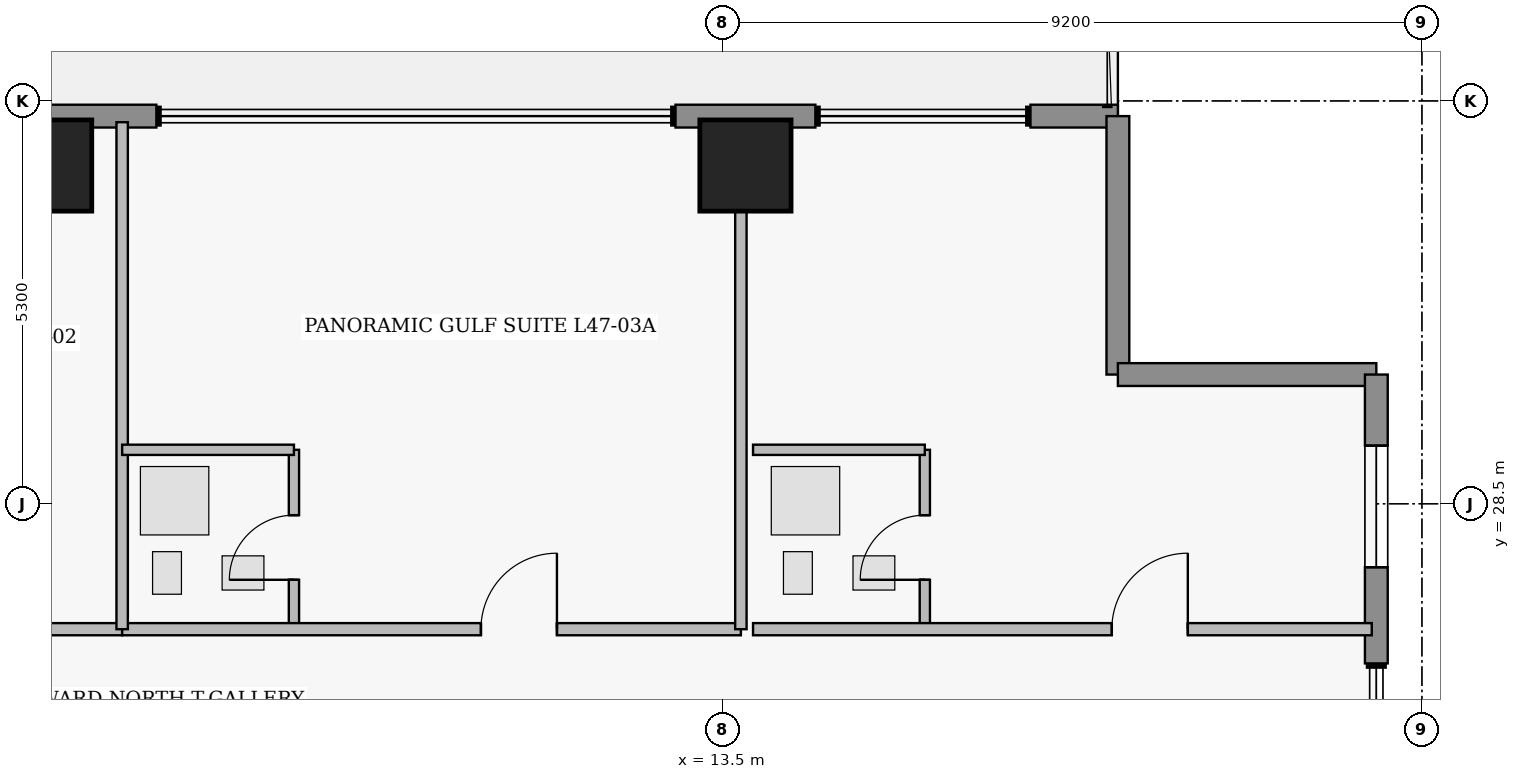
"""IFC4 building model, lengths in metres.
Left out: names, types, materials, properties, quantities, classifications, styles, units other than length and angle.
Written with IfcOpenShell. Run it as: python <this file> out.ifc"""

import sys

from ifc_helpers import new_model, si_unit, direction, frame, frame_2d, origin, origin_2d, place, context, subcontext, project, spatial, rectangle, extrude, element, fill, save


model = new_model("IFC4")
c1 = context("Model", 3, precision=1e-05, world=origin(), true_north=direction((0.0, 1.0)))
c2 = subcontext(c1, "Body", "Model", "MODEL_VIEW")
j1 = project(units=[si_unit("LENGTHUNIT", "METRE"), si_unit("PLANEANGLEUNIT", "RADIAN")], contexts=[c1])
p1 = place(None, origin())
s1 = spatial("IfcSite", under=j1, at=p1, CompositionType="ELEMENT")
p2 = place(p1, origin())
s2 = spatial("IfcBuilding", under=s1, at=p2, CompositionType="ELEMENT")
p3 = place(p2, frame((0.0, 0.0, 188.65)))
s3 = spatial("IfcBuildingStorey", under=s2, at=p3, CompositionType="ELEMENT", Elevation=188.65)
for number, where, z_axis, x_axis in (
    (1, (4.6, 32.95, 0.0), (0.0, 0.0, 1.0), (1.0, 0.0, 0.0)),
    (2, (13.8, 32.95, 0.0), (0.0, 0.0, 1.0), (1.0, 0.0, 0.0)),
):
    element("IfcColumn", number, at=place(p3, frame(where, z_axis=z_axis, x_axis=x_axis)), inside=s3, PredefinedType="COLUMN", context=c2, shape_type="SweptSolid", body=[
        extrude(rectangle(XDim=1.2, YDim=1.2, at=origin_2d()), origin(), (0.0, 0.0, 1.0), 3.75),
    ])
p4 = place(p3, frame((3.68, 33.6, 0.0), z_axis=(0.0, 0.0, 1.0), x_axis=(1.0, 0.0, 0.0)))
e3 = element("IfcWall", 3, at=p4, inside=s3, PredefinedType="STANDARD", context=c2, shape_type="SweptSolid", body=[
    extrude(rectangle(XDim=2.37, YDim=0.3, at=frame_2d((1.185, 0.0))), origin(), (0.0, 0.0, 1.0), 3.53),
])
p5 = place(p3, frame((12.88, 33.6, 0.0), z_axis=(0.0, 0.0, 1.0), x_axis=(1.0, 0.0, 0.0)))
e4 = element("IfcWall", 4, at=p5, inside=s3, PredefinedType="STANDARD", context=c2, shape_type="SweptSolid", body=[
    extrude(rectangle(XDim=1.84, YDim=0.3, at=frame_2d((0.92, 0.0))), origin(), (0.0, 0.0, 1.0), 3.53),
])
p6 = place(p3, frame((17.55, 33.6, 0.0), z_axis=(0.0, 0.0, 1.0), x_axis=(1.0, 0.0, 0.0)))
e5 = element("IfcWall", 5, at=p6, inside=s3, PredefinedType="STANDARD", context=c2, shape_type="SweptSolid", body=[
    extrude(rectangle(XDim=1.15, YDim=0.3, at=frame_2d((0.575, 0.0))), origin(), (0.0, 0.0, 1.0), 3.53),
])
for number, where, z_axis, x_axis in (
    (6, (18.7, 33.6, 0.0), (0.0, 0.0, 1.0), (0.0, -1.0, 0.0)),
    (7, (18.7, 30.2, 0.0), (0.0, 0.0, 1.0), (1.0, 0.0, 0.0)),
):
    element("IfcWall", number, at=place(p3, frame(where, z_axis=z_axis, x_axis=x_axis)), inside=s3, PredefinedType="STANDARD", context=c2, shape_type="SweptSolid", body=[
        extrude(rectangle(XDim=3.4, YDim=0.3, at=frame_2d((1.7, 0.0))), origin(), (0.0, 0.0, 1.0), 3.53),
    ])
p7 = place(p3, frame((22.1, 30.2, 0.0), z_axis=(0.0, 0.0, 1.0), x_axis=(0.0, -1.0, 0.0)))
e8 = element("IfcWall", 8, at=p7, inside=s3, PredefinedType="STANDARD", context=c2, shape_type="SweptSolid", body=[
    extrude(rectangle(XDim=3.8, YDim=0.3, at=frame_2d((1.9, 0.0))), origin(), (0.0, 0.0, 1.0), 3.53),
])
p8 = place(p7, frame((0.935, 0.0, 0.85)))
e9 = element("IfcOpeningElement", 9, at=p8, cuts=e8, PredefinedType="OPENING", context=c2, shape_type="SweptSolid", body=[
    extrude(rectangle(XDim=1.6, YDim=1.8, at=frame_2d((0.8, 0.9))), frame((0.0, 0.16, 0.0), z_axis=(0.0, -1.0, 0.0), x_axis=(1.0, 0.0, 0.0)), (0.0, 0.0, 1.0), 0.32),
])
p9 = place(p3, frame((-5.6, 26.85, 0.0), z_axis=(0.0, 0.0, 1.0), x_axis=(1.0, 0.0, 0.0)))
e10 = element("IfcWall", 10, at=p9, inside=s3, PredefinedType="PARTITIONING", context=c2, shape_type="SweptSolid", body=[
    extrude(rectangle(XDim=11.2, YDim=0.16, at=frame_2d((5.6, 0.0))), origin(), (0.0, 0.0, 1.0), 3.53),
])
p10 = place(p9, frame((6.25, 0.0, 0.0)))
e11 = element("IfcOpeningElement", 11, at=p10, cuts=e10, PredefinedType="OPENING", context=c2, shape_type="SweptSolid", body=[
    extrude(rectangle(XDim=1.0, YDim=2.15, at=frame_2d((0.5, 1.075))), frame((0.0, 0.09, 0.0), z_axis=(0.0, -1.0, 0.0), x_axis=(1.0, 0.0, 0.0)), (0.0, 0.0, 1.0), 0.18),
])
p11 = place(p3, frame((7.86, 26.85, 0.0), z_axis=(0.0, 0.0, 1.0), x_axis=(0.0, 1.0, 0.0)))
e12 = element("IfcWall", 12, at=p11, inside=s3, PredefinedType="PLUMBINGWALL", context=c2, shape_type="SweptSolid", body=[
    extrude(rectangle(XDim=2.36, YDim=0.135, at=frame_2d((1.18, 0.0))), origin(), (0.0, 0.0, 1.0), 3.53),
])
p12 = place(p11, frame((0.65, 0.0, 0.0)))
e13 = element("IfcOpeningElement", 13, at=p12, cuts=e12, PredefinedType="OPENING", context=c2, shape_type="SweptSolid", body=[
    extrude(rectangle(XDim=0.85, YDim=2.1, at=frame_2d((0.425, 1.05))), frame((0.0, 0.077, 0.0), z_axis=(0.0, -1.0, 0.0), x_axis=(1.0, 0.0, 0.0)), (0.0, 0.0, 1.0), 0.155),
])
p13 = place(p3, frame((5.6, 26.85, 0.0), z_axis=(0.0, 0.0, 1.0), x_axis=(1.0, 0.0, 0.0)))
e14 = element("IfcWall", 14, at=p13, inside=s3, PredefinedType="PARTITIONING", context=c2, shape_type="SweptSolid", body=[
    extrude(rectangle(XDim=8.14, YDim=0.16, at=frame_2d((4.07, 0.0))), origin(), (0.0, 0.0, 1.0), 3.53),
])
p14 = place(p13, frame((4.72, 0.0, 0.0)))
e15 = element("IfcOpeningElement", 15, at=p14, cuts=e14, PredefinedType="OPENING", context=c2, shape_type="SweptSolid", body=[
    extrude(rectangle(XDim=1.0, YDim=2.15, at=frame_2d((0.5, 1.075))), frame((0.0, 0.09, 0.0), z_axis=(0.0, -1.0, 0.0), x_axis=(1.0, 0.0, 0.0)), (0.0, 0.0, 1.0), 0.18),
])
p15 = place(p3, frame((16.16, 26.85, 0.0), z_axis=(0.0, 0.0, 1.0), x_axis=(0.0, 1.0, 0.0)))
e16 = element("IfcWall", 16, at=p15, inside=s3, PredefinedType="PLUMBINGWALL", context=c2, shape_type="SweptSolid", body=[
    extrude(rectangle(XDim=2.36, YDim=0.135, at=frame_2d((1.18, 0.0))), origin(), (0.0, 0.0, 1.0), 3.53),
])
p16 = place(p15, frame((0.65, 0.0, 0.0)))
e17 = element("IfcOpeningElement", 17, at=p16, cuts=e16, PredefinedType="OPENING", context=c2, shape_type="SweptSolid", body=[
    extrude(rectangle(XDim=0.85, YDim=2.1, at=frame_2d((0.425, 1.05))), frame((0.0, 0.077, 0.0), z_axis=(0.0, -1.0, 0.0), x_axis=(1.0, 0.0, 0.0)), (0.0, 0.0, 1.0), 0.155),
])
p17 = place(p3, frame((13.9, 26.85, 0.0), z_axis=(0.0, 0.0, 1.0), x_axis=(1.0, 0.0, 0.0)))
e18 = element("IfcWall", 18, at=p17, inside=s3, PredefinedType="PARTITIONING", context=c2, shape_type="SweptSolid", body=[
    extrude(rectangle(XDim=8.14, YDim=0.16, at=frame_2d((4.07, 0.0))), origin(), (0.0, 0.0, 1.0), 3.53),
])
p18 = place(p17, frame((4.72, 0.0, 0.0)))
e19 = element("IfcOpeningElement", 19, at=p18, cuts=e18, PredefinedType="OPENING", context=c2, shape_type="SweptSolid", body=[
    extrude(rectangle(XDim=1.0, YDim=2.15, at=frame_2d((0.5, 1.075))), frame((0.0, 0.09, 0.0), z_axis=(0.0, -1.0, 0.0), x_axis=(1.0, 0.0, 0.0)), (0.0, 0.0, 1.0), 0.18),
])
p19 = place(p3, frame((5.6, 26.85, 0.0), z_axis=(0.0, 0.0, 1.0), x_axis=(0.0, 1.0, 0.0)))
e20 = element("IfcWall", 20, at=p19, inside=s3, PredefinedType="PARTITIONING", context=c2, shape_type="SweptSolid", body=[
    extrude(rectangle(XDim=6.67, YDim=0.15, at=frame_2d((3.335, 0.0))), origin(), (0.0, 0.0, 1.0), 3.53),
])
p20 = place(p3, frame((5.6, 29.21, 0.0), z_axis=(0.0, 0.0, 1.0), x_axis=(1.0, 0.0, 0.0)))
e21 = element("IfcWall", 21, at=p20, inside=s3, PredefinedType="PLUMBINGWALL", context=c2, shape_type="SweptSolid", body=[
    extrude(rectangle(XDim=2.26, YDim=0.135, at=frame_2d((1.13, 0.0))), origin(), (0.0, 0.0, 1.0), 3.53),
])
p21 = place(p3, frame((13.74, 26.85, 0.0), z_axis=(0.0, 0.0, 1.0), x_axis=(0.0, 1.0, 0.0)))
e22 = element("IfcWall", 22, at=p21, inside=s3, PredefinedType="PARTITIONING", context=c2, shape_type="SweptSolid", body=[
    extrude(rectangle(XDim=6.67, YDim=0.15, at=frame_2d((3.335, 0.0))), origin(), (0.0, 0.0, 1.0), 2.519),
])
p22 = place(p3, frame((13.9, 29.21, 0.0), z_axis=(0.0, 0.0, 1.0), x_axis=(1.0, 0.0, 0.0)))
e23 = element("IfcWall", 23, at=p22, inside=s3, PredefinedType="PLUMBINGWALL", context=c2, shape_type="SweptSolid", body=[
    extrude(rectangle(XDim=2.26, YDim=0.135, at=frame_2d((1.13, 0.0))), origin(), (0.0, 0.0, 1.0), 3.53),
])
p23 = place(p8, origin())
e24 = element("IfcWindow", 24, at=p23, inside=s3, PartitioningType="SINGLE_PANEL", PredefinedType="WINDOW", context=c2, shape_type="SweptSolid", body=[
    extrude(rectangle(XDim=1.6, YDim=1.8, at=frame_2d((0.8, 0.9))), frame((0.0, 0.03, 0.0), z_axis=(0.0, -1.0, 0.0), x_axis=(1.0, 0.0, 0.0)), (0.0, 0.0, 1.0), 0.06),
])
fill(e9, e24)
p24 = place(p12, origin())
e25 = element("IfcDoor", 25, at=p24, inside=s3, OperationType="SINGLE_SWING_LEFT", PredefinedType="DOOR", context=c2, shape_type="SweptSolid", body=[
    extrude(rectangle(XDim=0.85, YDim=2.1, at=frame_2d((0.425, 1.05))), frame((0.0, 0.025, 0.0), z_axis=(0.0, -1.0, 0.0), x_axis=(1.0, 0.0, 0.0)), (0.0, 0.0, 1.0), 0.05),
])
fill(e13, e25)
p25 = place(p14, origin())
e26 = element("IfcDoor", 26, at=p25, inside=s3, OperationType="SINGLE_SWING_RIGHT", PredefinedType="DOOR", context=c2, shape_type="SweptSolid", body=[
    extrude(rectangle(XDim=1.0, YDim=2.15, at=frame_2d((0.5, 1.075))), frame((0.0, 0.025, 0.0), z_axis=(0.0, -1.0, 0.0), x_axis=(1.0, 0.0, 0.0)), (0.0, 0.0, 1.0), 0.05),
])
fill(e15, e26)
p26 = place(p16, origin())
e27 = element("IfcDoor", 27, at=p26, inside=s3, OperationType="SINGLE_SWING_LEFT", PredefinedType="DOOR", context=c2, shape_type="SweptSolid", body=[
    extrude(rectangle(XDim=0.85, YDim=2.1, at=frame_2d((0.425, 1.05))), frame((0.0, 0.025, 0.0), z_axis=(0.0, -1.0, 0.0), x_axis=(1.0, 0.0, 0.0)), (0.0, 0.0, 1.0), 0.05),
])
fill(e17, e27)
p27 = place(p18, origin())
e28 = element("IfcDoor", 28, at=p27, inside=s3, OperationType="SINGLE_SWING_RIGHT", PredefinedType="DOOR", context=c2, shape_type="SweptSolid", body=[
    extrude(rectangle(XDim=1.0, YDim=2.15, at=frame_2d((0.5, 1.075))), frame((0.0, 0.025, 0.0), z_axis=(0.0, -1.0, 0.0), x_axis=(1.0, 0.0, 0.0)), (0.0, 0.0, 1.0), 0.05),
])
fill(e19, e28)
save(model, sys.argv[1])
